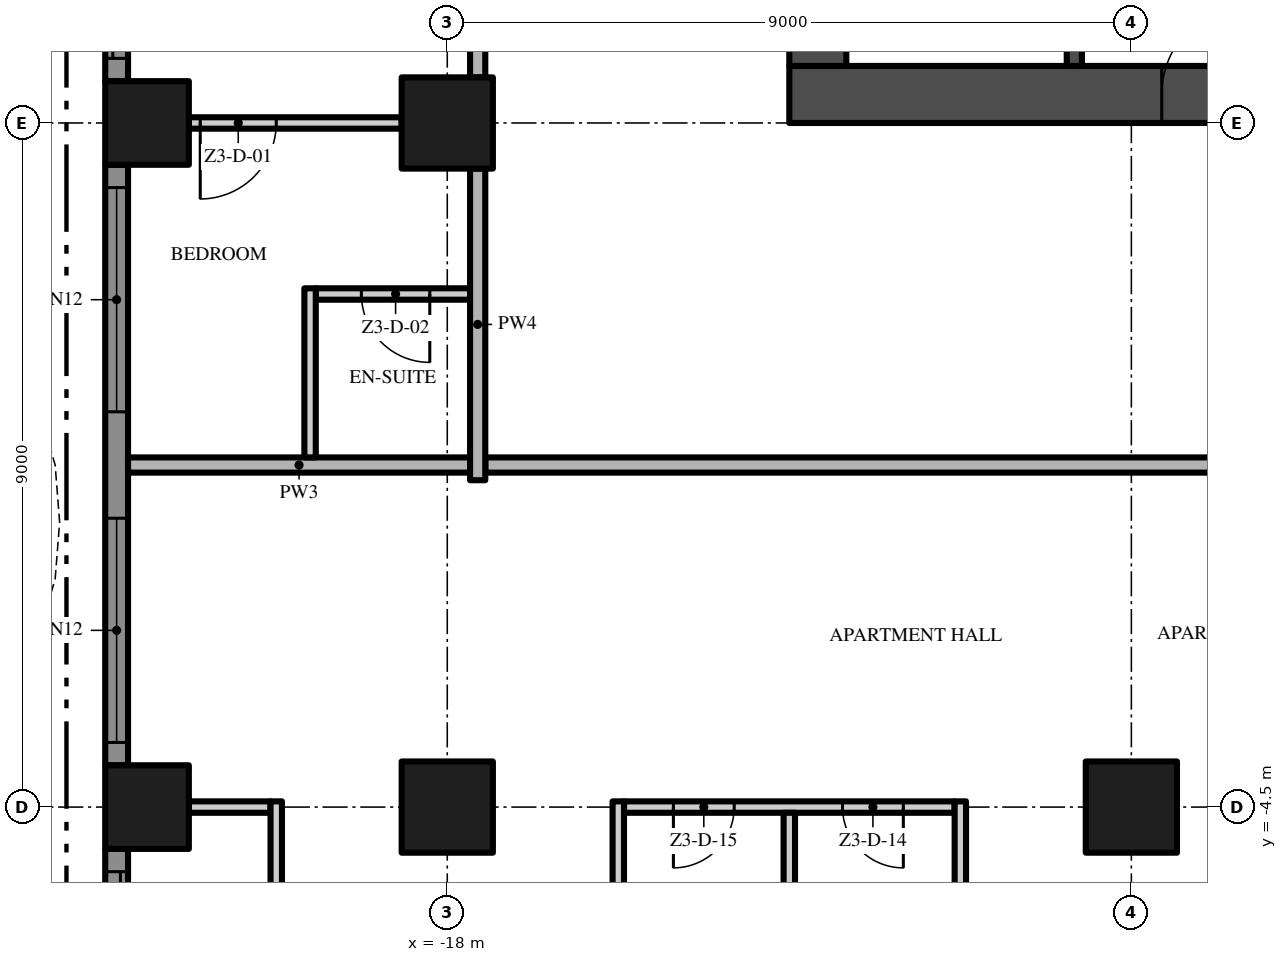
"""IFC4 building model, lengths in metres.
Left out: names, types, materials, properties, quantities, classifications, styles, units other than length and angle.
Written with IfcOpenShell. Run it as: python <this file> out.ifc"""

import sys

from ifc_helpers import new_model, si_unit, direction, frame, frame_2d, origin, origin_2d, place, context, subcontext, project, spatial, polyline, rectangle, outline, extrude, element, fill, save


model = new_model("IFC4")
c1 = context("Model", 3, precision=1e-05, world=origin(), true_north=direction((0.0, 1.0)))
c2 = subcontext(c1, "Body", "Model", "MODEL_VIEW")
j1 = project(units=[si_unit("LENGTHUNIT", "METRE"), si_unit("PLANEANGLEUNIT", "RADIAN")], contexts=[c1])
p1 = place(None, origin())
s1 = spatial("IfcSite", under=j1, at=p1, CompositionType="ELEMENT")
p2 = place(p1, origin())
s2 = spatial("IfcBuilding", under=s1, at=p2, CompositionType="ELEMENT")
p3 = place(p2, frame((0.0, 0.0, 159.2)))
s3 = spatial("IfcBuildingStorey", under=s2, at=p3, CompositionType="ELEMENT", Elevation=159.2)
p4 = place(p3, frame((-13.5, 4.875, -0.3), z_axis=(0.0, 0.0, 1.0), x_axis=(1.0, 0.0, 0.0)))
e1 = element("IfcWall", 1, at=p4, inside=s3, PredefinedType="SHEAR", context=c2, shape_type="SweptSolid", body=[
    extrude(rectangle(XDim=27.0, YDim=0.75, at=frame_2d((13.5, 0.0))), origin(), (0.0, 0.0, 1.0), 3.8),
])
p5 = place(p4, frame((12.0, 0.0, 0.3)))
e2 = element("IfcOpeningElement", 2, at=p5, cuts=e1, PredefinedType="OPENING", context=c2, shape_type="SweptSolid", body=[
    extrude(rectangle(XDim=3.0, YDim=2.4, at=frame_2d((1.5, 1.2))), frame((0.0, 0.385, 0.0), z_axis=(0.0, -1.0, 0.0), x_axis=(1.0, 0.0, 0.0)), (0.0, 0.0, 1.0), 0.77),
])
p6 = place(p4, frame((4.9, 0.0, 0.3)))
e3 = element("IfcOpeningElement", 3, at=p6, cuts=e1, PredefinedType="OPENING", context=c2, shape_type="SweptSolid", body=[
    extrude(rectangle(XDim=1.2, YDim=2.2, at=frame_2d((0.6, 1.1))), frame((0.0, 0.385, 0.0), z_axis=(0.0, -1.0, 0.0), x_axis=(1.0, 0.0, 0.0)), (0.0, 0.0, 1.0), 0.77),
])
p7 = place(p4, frame((20.75, 0.0, 0.3)))
e4 = element("IfcOpeningElement", 4, at=p7, cuts=e1, PredefinedType="OPENING", context=c2, shape_type="SweptSolid", body=[
    extrude(rectangle(XDim=1.5, YDim=2.2, at=frame_2d((0.75, 1.1))), frame((0.0, 0.385, 0.0), z_axis=(0.0, -1.0, 0.0), x_axis=(1.0, 0.0, 0.0)), (0.0, 0.0, 1.0), 0.77),
])
p8 = place(p4, frame((17.4, 0.0, 0.3)))
e5 = element("IfcOpeningElement", 5, at=p8, cuts=e1, PredefinedType="OPENING", context=c2, shape_type="SweptSolid", body=[
    extrude(rectangle(XDim=1.2, YDim=2.2, at=frame_2d((0.6, 1.1))), frame((0.0, 0.385, 0.0), z_axis=(0.0, -1.0, 0.0), x_axis=(1.0, 0.0, 0.0)), (0.0, 0.0, 1.0), 0.77),
])
p9 = place(p3, frame((-13.125, 21.75, -0.3), z_axis=(0.0, 0.0, 1.0), x_axis=(0.0, -1.0, 0.0)))
e6 = element("IfcWall", 6, at=p9, inside=s3, PredefinedType="SHEAR", context=c2, shape_type="SweptSolid", body=[
    extrude(rectangle(XDim=16.5, YDim=0.75, at=frame_2d((8.25, 0.0))), origin(), (0.0, 0.0, 1.0), 3.8),
])
p10 = place(p9, frame((9.15, 0.0, 0.3)))
e7 = element("IfcOpeningElement", 7, at=p10, cuts=e6, PredefinedType="OPENING", context=c2, shape_type="SweptSolid", body=[
    extrude(rectangle(XDim=1.2, YDim=2.2, at=frame_2d((0.6, 1.1))), frame((0.0, 0.385, 0.0), z_axis=(0.0, -1.0, 0.0), x_axis=(1.0, 0.0, 0.0)), (0.0, 0.0, 1.0), 0.77),
])
for number, where, z_axis, x_axis in (
    (8, (-18.0, -4.5, 0.0), (0.0, 0.0, 1.0), (1.0, 0.0, 0.0)),
    (9, (-18.0, 4.5, 0.0), (0.0, 0.0, 1.0), (1.0, 0.0, 0.0)),
):
    element("IfcColumn", number, at=place(p3, frame(where, z_axis=z_axis, x_axis=x_axis)), inside=s3, PredefinedType="COLUMN", context=c2, shape_type="SweptSolid", body=[
        extrude(rectangle(XDim=1.2, YDim=1.2, at=origin_2d()), origin(), (0.0, 0.0, 1.0), 3.5),
    ])
for number, where, z_axis, x_axis in (
    (10, (-21.95, -4.5, 0.0), (0.0, 0.0, 1.0), (1.0, 0.0, 0.0)),
    (11, (-21.95, 4.5, 0.0), (0.0, 0.0, 1.0), (1.0, 0.0, 0.0)),
):
    element("IfcColumn", number, at=place(p3, frame(where, z_axis=z_axis, x_axis=x_axis)), inside=s3, PredefinedType="COLUMN", context=c2, shape_type="SweptSolid", body=[
        extrude(rectangle(XDim=1.1, YDim=1.1, at=origin_2d()), origin(), (0.0, 0.0, 1.0), 3.5),
    ])
p11 = place(p3, frame((-9.0, -4.5, 0.0), z_axis=(0.0, 0.0, 1.0), x_axis=(1.0, 0.0, 0.0)))
e12 = element("IfcColumn", 12, at=p11, inside=s3, PredefinedType="COLUMN", context=c2, shape_type="SweptSolid", body=[
    extrude(rectangle(XDim=1.2, YDim=1.2, at=origin_2d()), origin(), (0.0, 0.0, 1.0), 3.5),
])
p12 = place(p3, frame((-22.35, 5.05, 0.0), z_axis=(0.0, 0.0, 1.0), x_axis=(0.0, 1.0, 0.0)))
e13 = element("IfcWall", 13, at=p12, inside=s3, PredefinedType="SOLIDWALL", context=c2, shape_type="SweptSolid", body=[
    extrude(rectangle(XDim=7.9, YDim=0.3, at=frame_2d((3.95, 0.0))), origin(), (0.0, 0.0, 1.0), 3.5),
])
p13 = place(p12, frame((4.65, 0.0, 0.45)))
e14 = element("IfcOpeningElement", 14, at=p13, cuts=e13, PredefinedType="OPENING", context=c2, shape_type="SweptSolid", body=[
    extrude(rectangle(XDim=2.95, YDim=2.65, at=frame_2d((1.475, 1.325))), frame((0.0, 0.16, 0.0), z_axis=(0.0, -1.0, 0.0), x_axis=(1.0, 0.0, 0.0)), (0.0, 0.0, 1.0), 0.32),
])
p14 = place(p12, frame((0.3, 0.0, 0.0)))
e15 = element("IfcOpeningElement", 15, at=p14, cuts=e13, PredefinedType="OPENING", context=c2, shape_type="SweptSolid", body=[
    extrude(rectangle(XDim=2.95, YDim=2.4, at=frame_2d((1.475, 1.2))), frame((0.0, 0.16, 0.0), z_axis=(0.0, -1.0, 0.0), x_axis=(1.0, 0.0, 0.0)), (0.0, 0.0, 1.0), 0.32),
])
p15 = place(p3, frame((-22.35, -3.95, 0.0), z_axis=(0.0, 0.0, 1.0), x_axis=(0.0, 1.0, 0.0)))
e16 = element("IfcWall", 16, at=p15, inside=s3, PredefinedType="SOLIDWALL", context=c2, shape_type="SweptSolid", body=[
    extrude(rectangle(XDim=7.9, YDim=0.3, at=frame_2d((3.95, 0.0))), origin(), (0.0, 0.0, 1.0), 3.5),
])
p16 = place(p15, frame((4.65, 0.0, 0.45)))
e17 = element("IfcOpeningElement", 17, at=p16, cuts=e16, PredefinedType="OPENING", context=c2, shape_type="SweptSolid", body=[
    extrude(rectangle(XDim=2.95, YDim=2.65, at=frame_2d((1.475, 1.325))), frame((0.0, 0.16, 0.0), z_axis=(0.0, -1.0, 0.0), x_axis=(1.0, 0.0, 0.0)), (0.0, 0.0, 1.0), 0.32),
])
p17 = place(p15, frame((0.3, 0.0, 0.45)))
e18 = element("IfcOpeningElement", 18, at=p17, cuts=e16, PredefinedType="OPENING", context=c2, shape_type="SweptSolid", body=[
    extrude(rectangle(XDim=2.95, YDim=2.65, at=frame_2d((1.475, 1.325))), frame((0.0, 0.16, 0.0), z_axis=(0.0, -1.0, 0.0), x_axis=(1.0, 0.0, 0.0)), (0.0, 0.0, 1.0), 0.32),
])
p18 = place(p3, frame((-22.35, -12.4, 0.0), z_axis=(0.0, 0.0, 1.0), x_axis=(0.0, 1.0, 0.0)))
e19 = element("IfcWall", 19, at=p18, inside=s3, PredefinedType="SOLIDWALL", context=c2, shape_type="SweptSolid", body=[
    extrude(rectangle(XDim=7.35, YDim=0.3, at=frame_2d((3.675, 0.0))), origin(), (0.0, 0.0, 1.0), 3.5),
])
p19 = place(p18, frame((4.1, 0.0, 0.0)))
e20 = element("IfcOpeningElement", 20, at=p19, cuts=e19, PredefinedType="OPENING", context=c2, shape_type="SweptSolid", body=[
    extrude(rectangle(XDim=2.95, YDim=2.4, at=frame_2d((1.475, 1.2))), frame((0.0, 0.16, 0.0), z_axis=(0.0, -1.0, 0.0), x_axis=(1.0, 0.0, 0.0)), (0.0, 0.0, 1.0), 0.32),
])
p20 = place(p18, frame((0.3, 0.0, 0.45)))
e21 = element("IfcOpeningElement", 21, at=p20, cuts=e19, PredefinedType="OPENING", context=c2, shape_type="SweptSolid", body=[
    extrude(rectangle(XDim=2.4, YDim=2.65, at=frame_2d((1.2, 1.325))), frame((0.0, 0.16, 0.0), z_axis=(0.0, -1.0, 0.0), x_axis=(1.0, 0.0, 0.0)), (0.0, 0.0, 1.0), 0.32),
])
p21 = place(p3, origin())
e22 = element("IfcWall", 22, at=p21, inside=s3, PredefinedType="USERDEFINED", context=c2, shape_type="SweptSolid", body=[
    extrude(outline(polyline([(-24.3, 18.0), (-23.595, 16.5), (-23.159, 15.0), (-23.1, 14.25), (-23.159, 13.5), (-23.595, 12.0), (-24.3, 10.5), (-25.005, 9.0), (-25.441, 7.5), (-25.5, 6.75), (-25.441, 6.0), (-25.005, 4.5), (-24.3, 3.0), (-23.595, 1.5), (-23.159, 0.0), (-23.1, -0.75), (-23.159, -1.5), (-23.595, -3.0), (-24.3, -4.5), (-25.005, -6.0), (-25.441, -7.5), (-25.5, -8.25), (-25.441, -9.0), (-25.005, -10.5), (-24.3, -12.0), (-23.595, -13.5), (-23.368, -13.394), (-24.074, -11.894), (-24.771, -10.411), (-25.194, -8.955), (-25.249, -8.25), (-25.194, -7.545), (-24.771, -6.089), (-24.074, -4.606), (-23.36, -3.089), (-22.911, -1.545), (-22.849, -0.75), (-22.911, 0.045), (-23.36, 1.589), (-24.074, 3.106), (-24.771, 4.589), (-25.194, 6.045), (-25.249, 6.75), (-25.194, 7.455), (-24.771, 8.911), (-24.074, 10.394), (-23.36, 11.911), (-22.911, 13.455), (-22.849, 14.25), (-22.911, 15.045), (-23.36, 16.589), (-24.074, 18.106), (-24.3, 18.0)])), origin(), (0.0, 0.0, 1.0), 0.9),
])
p22 = place(p3, frame((-9.75, 5.25, 0.0), z_axis=(0.0, 0.0, 1.0), x_axis=(0.0, 1.0, 0.0)))
e23 = element("IfcWall", 23, at=p22, inside=s3, PredefinedType="SHEAR", context=c2, shape_type="SweptSolid", body=[
    extrude(rectangle(XDim=2.7, YDim=0.2, at=frame_2d((1.35, 0.0))), origin(), (0.0, 0.0, 1.0), 3.5),
])
p23 = place(p3, frame((-21.4, -4.5, 0.0), z_axis=(0.0, 0.0, 1.0), x_axis=(1.0, 0.0, 0.0)))
e24 = element("IfcWall", 24, at=p23, inside=s3, PredefinedType="PARTITIONING", context=c2, shape_type="SweptSolid", body=[
    extrude(rectangle(XDim=1.075, YDim=0.15, at=frame_2d((0.537, 0.0))), origin(), (0.0, 0.0, 1.0), 3.5),
])
p24 = place(p3, frame((-11.325, -4.5, 0.0), z_axis=(0.0, 0.0, 1.0), x_axis=(-1.0, 0.0, 0.0)))
e25 = element("IfcWall", 25, at=p24, inside=s3, PredefinedType="PARTITIONING", context=c2, shape_type="SweptSolid", body=[
    extrude(rectangle(XDim=4.35, YDim=0.15, at=frame_2d((2.175, 0.0))), origin(), (0.0, 0.0, 1.0), 3.5),
])
p25 = place(p24, frame((0.675, 0.0, 0.0)))
e26 = element("IfcOpeningElement", 26, at=p25, cuts=e25, PredefinedType="OPENING", context=c2, shape_type="SweptSolid", body=[
    extrude(rectangle(XDim=0.8, YDim=2.0, at=frame_2d((0.4, 1.0))), frame((0.0, 0.085, 0.0), z_axis=(0.0, -1.0, 0.0), x_axis=(1.0, 0.0, 0.0)), (0.0, 0.0, 1.0), 0.17),
])
p26 = place(p24, frame((2.9, 0.0, 0.0)))
e27 = element("IfcOpeningElement", 27, at=p26, cuts=e25, PredefinedType="OPENING", context=c2, shape_type="SweptSolid", body=[
    extrude(rectangle(XDim=0.8, YDim=2.0, at=frame_2d((0.4, 1.0))), frame((0.0, 0.085, 0.0), z_axis=(0.0, -1.0, 0.0), x_axis=(1.0, 0.0, 0.0)), (0.0, 0.0, 1.0), 0.17),
])
p27 = place(p3, frame((17.5, 0.0, 0.0), z_axis=(0.0, 0.0, 1.0), x_axis=(-1.0, 0.0, 0.0)))
e28 = element("IfcWall", 28, at=p27, inside=s3, PredefinedType="PARTITIONING", context=c2, shape_type="SweptSolid", body=[
    extrude(rectangle(XDim=35.0, YDim=0.2, at=frame_2d((17.5, 0.0))), origin(), (0.0, 0.0, 1.0), 3.5),
])
p28 = place(p27, frame((23.5, 0.0, 0.0)))
e29 = element("IfcOpeningElement", 29, at=p28, cuts=e28, PredefinedType="OPENING", context=c2, shape_type="SweptSolid", body=[
    extrude(rectangle(XDim=1.5, YDim=2.4, at=frame_2d((0.75, 1.2))), frame((0.0, 0.11, 0.0), z_axis=(0.0, -1.0, 0.0), x_axis=(1.0, 0.0, 0.0)), (0.0, 0.0, 1.0), 0.22),
])
p29 = place(p27, frame((5.5, 0.0, 0.0)))
e30 = element("IfcOpeningElement", 30, at=p29, cuts=e28, PredefinedType="OPENING", context=c2, shape_type="SweptSolid", body=[
    extrude(rectangle(XDim=1.5, YDim=2.4, at=frame_2d((0.75, 1.2))), frame((0.0, 0.11, 0.0), z_axis=(0.0, -1.0, 0.0), x_axis=(1.0, 0.0, 0.0)), (0.0, 0.0, 1.0), 0.22),
])
p30 = place(p3, frame((-22.2, 0.0, 0.0), z_axis=(0.0, 0.0, 1.0), x_axis=(1.0, 0.0, 0.0)))
e31 = element("IfcWall", 31, at=p30, inside=s3, PredefinedType="PARTITIONING", context=c2, shape_type="SweptSolid", body=[
    extrude(rectangle(XDim=4.5, YDim=0.2, at=frame_2d((2.25, 0.0))), origin(), (0.0, 0.0, 1.0), 3.5),
])
p31 = place(p3, frame((-17.7, 2.25, 0.0), z_axis=(0.0, 0.0, 1.0), x_axis=(-1.0, 0.0, 0.0)))
e32 = element("IfcWall", 32, at=p31, inside=s3, PredefinedType="PARTITIONING", context=c2, shape_type="SweptSolid", body=[
    extrude(rectangle(XDim=2.03, YDim=0.15, at=frame_2d((1.015, 0.0))), origin(), (0.0, 0.0, 1.0), 3.5),
])
p32 = place(p31, frame((0.53, 0.0, 0.0)))
e33 = element("IfcOpeningElement", 33, at=p32, cuts=e32, PredefinedType="OPENING", context=c2, shape_type="SweptSolid", body=[
    extrude(rectangle(XDim=0.9, YDim=2.1, at=frame_2d((0.45, 1.05))), frame((0.0, 0.085, 0.0), z_axis=(0.0, -1.0, 0.0), x_axis=(1.0, 0.0, 0.0)), (0.0, 0.0, 1.0), 0.17),
])
p33 = place(p3, frame((-18.6, 4.5, 0.0), z_axis=(0.0, 0.0, 1.0), x_axis=(-1.0, 0.0, 0.0)))
e34 = element("IfcWall", 34, at=p33, inside=s3, PredefinedType="PARTITIONING", context=c2, shape_type="SweptSolid", body=[
    extrude(rectangle(XDim=2.8, YDim=0.15, at=frame_2d((1.4, 0.0))), origin(), (0.0, 0.0, 1.0), 3.5),
])
p34 = place(p33, frame((1.65, 0.0, 0.0)))
e35 = element("IfcOpeningElement", 35, at=p34, cuts=e34, PredefinedType="OPENING", context=c2, shape_type="SweptSolid", body=[
    extrude(rectangle(XDim=1.0, YDim=2.4, at=frame_2d((0.5, 1.2))), frame((0.0, 0.085, 0.0), z_axis=(0.0, -1.0, 0.0), x_axis=(1.0, 0.0, 0.0)), (0.0, 0.0, 1.0), 0.17),
])
p35 = place(p3, frame((-20.25, -8.925, 0.0), z_axis=(0.0, 0.0, 1.0), x_axis=(0.0, 1.0, 0.0)))
e36 = element("IfcWall", 36, at=p35, inside=s3, PredefinedType="PARTITIONING", context=c2, shape_type="SweptSolid", body=[
    extrude(rectangle(XDim=4.5, YDim=0.15, at=frame_2d((2.25, 0.0))), origin(), (0.0, 0.0, 1.0), 3.5),
])
p36 = place(p35, frame((1.75, 0.0, 0.0)))
e37 = element("IfcOpeningElement", 37, at=p36, cuts=e36, PredefinedType="OPENING", context=c2, shape_type="SweptSolid", body=[
    extrude(rectangle(XDim=0.9, YDim=2.1, at=frame_2d((0.45, 1.05))), frame((0.0, 0.085, 0.0), z_axis=(0.0, -1.0, 0.0), x_axis=(1.0, 0.0, 0.0)), (0.0, 0.0, 1.0), 0.17),
])
p37 = place(p3, frame((-19.805, 0.1, 0.0), z_axis=(0.0, 0.0, 1.0), x_axis=(0.0, 1.0, 0.0)))
e38 = element("IfcWall", 38, at=p37, inside=s3, PredefinedType="PARTITIONING", context=c2, shape_type="SweptSolid", body=[
    extrude(rectangle(XDim=2.225, YDim=0.15, at=frame_2d((1.113, 0.0))), origin(), (0.0, 0.0, 1.0), 3.5),
])
p38 = place(p3, frame((-17.6, -0.2, 0.0), z_axis=(0.0, 0.0, 1.0), x_axis=(0.0, 1.0, 0.0)))
e39 = element("IfcWall", 39, at=p38, inside=s3, PredefinedType="PARTITIONING", context=c2, shape_type="SweptSolid", body=[
    extrude(rectangle(XDim=4.1, YDim=0.2, at=frame_2d((2.05, 0.0))), origin(), (0.0, 0.0, 1.0), 3.5),
])
p39 = place(p3, frame((-17.6, 5.1, 0.0), z_axis=(0.0, 0.0, 1.0), x_axis=(0.0, 1.0, 0.0)))
e40 = element("IfcWall", 40, at=p39, inside=s3, PredefinedType="PARTITIONING", context=c2, shape_type="SweptSolid", body=[
    extrude(rectangle(XDim=7.8, YDim=0.2, at=frame_2d((3.9, 0.0))), origin(), (0.0, 0.0, 1.0), 3.5),
])
p40 = place(p39, frame((1.05, 0.0, 0.0)))
e41 = element("IfcOpeningElement", 41, at=p40, cuts=e40, PredefinedType="OPENING", context=c2, shape_type="SweptSolid", body=[
    extrude(rectangle(XDim=1.2, YDim=2.4, at=frame_2d((0.6, 1.2))), frame((0.0, 0.11, 0.0), z_axis=(0.0, -1.0, 0.0), x_axis=(1.0, 0.0, 0.0)), (0.0, 0.0, 1.0), 0.22),
])
p41 = place(p3, frame((-15.75, -12.075, 0.0), z_axis=(0.0, 0.0, 1.0), x_axis=(0.0, 1.0, 0.0)))
e42 = element("IfcWall", 42, at=p41, inside=s3, PredefinedType="PARTITIONING", context=c2, shape_type="SweptSolid", body=[
    extrude(rectangle(XDim=7.65, YDim=0.15, at=frame_2d((3.825, 0.0))), origin(), (0.0, 0.0, 1.0), 3.5),
])
p42 = place(p3, frame((-13.5, -17.7, 0.0), z_axis=(0.0, 0.0, 1.0), x_axis=(0.0, 1.0, 0.0)))
e43 = element("IfcWall", 43, at=p42, inside=s3, PredefinedType="PARTITIONING", context=c2, shape_type="SweptSolid", body=[
    extrude(rectangle(XDim=13.125, YDim=0.15, at=frame_2d((6.562, 0.0))), origin(), (0.0, 0.0, 1.0), 3.5),
])
p43 = place(p3, frame((-11.25, -12.075, 0.0), z_axis=(0.0, 0.0, 1.0), x_axis=(0.0, 1.0, 0.0)))
e44 = element("IfcWall", 44, at=p43, inside=s3, PredefinedType="PARTITIONING", context=c2, shape_type="SweptSolid", body=[
    extrude(rectangle(XDim=7.65, YDim=0.15, at=frame_2d((3.825, 0.0))), origin(), (0.0, 0.0, 1.0), 3.5),
])
p44 = place(p14, origin())
e45 = element("IfcDoor", 45, at=p44, inside=s3, OperationType="SINGLE_SWING_LEFT", PredefinedType="DOOR", context=c2, shape_type="SweptSolid", body=[
    extrude(rectangle(XDim=2.95, YDim=2.4, at=frame_2d((1.475, 1.2))), frame((0.0, 0.025, 0.0), z_axis=(0.0, -1.0, 0.0), x_axis=(1.0, 0.0, 0.0)), (0.0, 0.0, 1.0), 0.05),
])
fill(e15, e45)
p45 = place(p16, origin())
e46 = element("IfcWindow", 46, at=p45, inside=s3, PartitioningType="SINGLE_PANEL", PredefinedType="WINDOW", context=c2, shape_type="SweptSolid", body=[
    extrude(rectangle(XDim=2.95, YDim=2.65, at=frame_2d((1.475, 1.325))), frame((0.0, 0.03, 0.0), z_axis=(0.0, -1.0, 0.0), x_axis=(1.0, 0.0, 0.0)), (0.0, 0.0, 1.0), 0.06),
])
fill(e17, e46)
p46 = place(p17, origin())
e47 = element("IfcWindow", 47, at=p46, inside=s3, PartitioningType="SINGLE_PANEL", PredefinedType="WINDOW", context=c2, shape_type="SweptSolid", body=[
    extrude(rectangle(XDim=2.95, YDim=2.65, at=frame_2d((1.475, 1.325))), frame((0.0, 0.03, 0.0), z_axis=(0.0, -1.0, 0.0), x_axis=(1.0, 0.0, 0.0)), (0.0, 0.0, 1.0), 0.06),
])
fill(e18, e47)
p47 = place(p19, origin())
e48 = element("IfcDoor", 48, at=p47, inside=s3, OperationType="SINGLE_SWING_LEFT", PredefinedType="DOOR", context=c2, shape_type="SweptSolid", body=[
    extrude(rectangle(XDim=2.95, YDim=2.4, at=frame_2d((1.475, 1.2))), frame((0.0, 0.025, 0.0), z_axis=(0.0, -1.0, 0.0), x_axis=(1.0, 0.0, 0.0)), (0.0, 0.0, 1.0), 0.05),
])
fill(e20, e48)
p48 = place(p6, frame((1.2, 0.0, 0.0), z_axis=(0.0, 0.0, 1.0), x_axis=(-1.0, 0.0, 0.0)))
e49 = element("IfcDoor", 49, at=p48, inside=s3, OperationType="SINGLE_SWING_LEFT", PredefinedType="DOOR", context=c2, shape_type="SweptSolid", body=[
    extrude(rectangle(XDim=1.2, YDim=2.2, at=frame_2d((0.6, 1.1))), frame((0.0, 0.025, 0.0), z_axis=(0.0, -1.0, 0.0), x_axis=(1.0, 0.0, 0.0)), (0.0, 0.0, 1.0), 0.05),
])
fill(e3, e49)
p49 = place(p34, origin())
e50 = element("IfcDoor", 50, at=p49, inside=s3, OperationType="SINGLE_SWING_RIGHT", PredefinedType="DOOR", context=c2, shape_type="SweptSolid", body=[
    extrude(rectangle(XDim=1.0, YDim=2.4, at=frame_2d((0.5, 1.2))), frame((0.0, 0.025, 0.0), z_axis=(0.0, -1.0, 0.0), x_axis=(1.0, 0.0, 0.0)), (0.0, 0.0, 1.0), 0.05),
])
fill(e35, e50)
p50 = place(p32, origin())
e51 = element("IfcDoor", 51, at=p50, inside=s3, OperationType="SINGLE_SWING_LEFT", PredefinedType="DOOR", context=c2, shape_type="SweptSolid", body=[
    extrude(rectangle(XDim=0.9, YDim=2.1, at=frame_2d((0.45, 1.05))), frame((0.0, 0.025, 0.0), z_axis=(0.0, -1.0, 0.0), x_axis=(1.0, 0.0, 0.0)), (0.0, 0.0, 1.0), 0.05),
])
fill(e33, e51)
p51 = place(p25, origin())
e52 = element("IfcDoor", 52, at=p51, inside=s3, OperationType="SINGLE_SWING_LEFT", PredefinedType="DOOR", context=c2, shape_type="SweptSolid", body=[
    extrude(rectangle(XDim=0.8, YDim=2.0, at=frame_2d((0.4, 1.0))), frame((0.0, 0.025, 0.0), z_axis=(0.0, -1.0, 0.0), x_axis=(1.0, 0.0, 0.0)), (0.0, 0.0, 1.0), 0.05),
])
fill(e26, e52)
p52 = place(p26, origin())
e53 = element("IfcDoor", 53, at=p52, inside=s3, OperationType="SINGLE_SWING_RIGHT", PredefinedType="DOOR", context=c2, shape_type="SweptSolid", body=[
    extrude(rectangle(XDim=0.8, YDim=2.0, at=frame_2d((0.4, 1.0))), frame((0.0, 0.025, 0.0), z_axis=(0.0, -1.0, 0.0), x_axis=(1.0, 0.0, 0.0)), (0.0, 0.0, 1.0), 0.05),
])
fill(e27, e53)
save(model, sys.argv[1])
